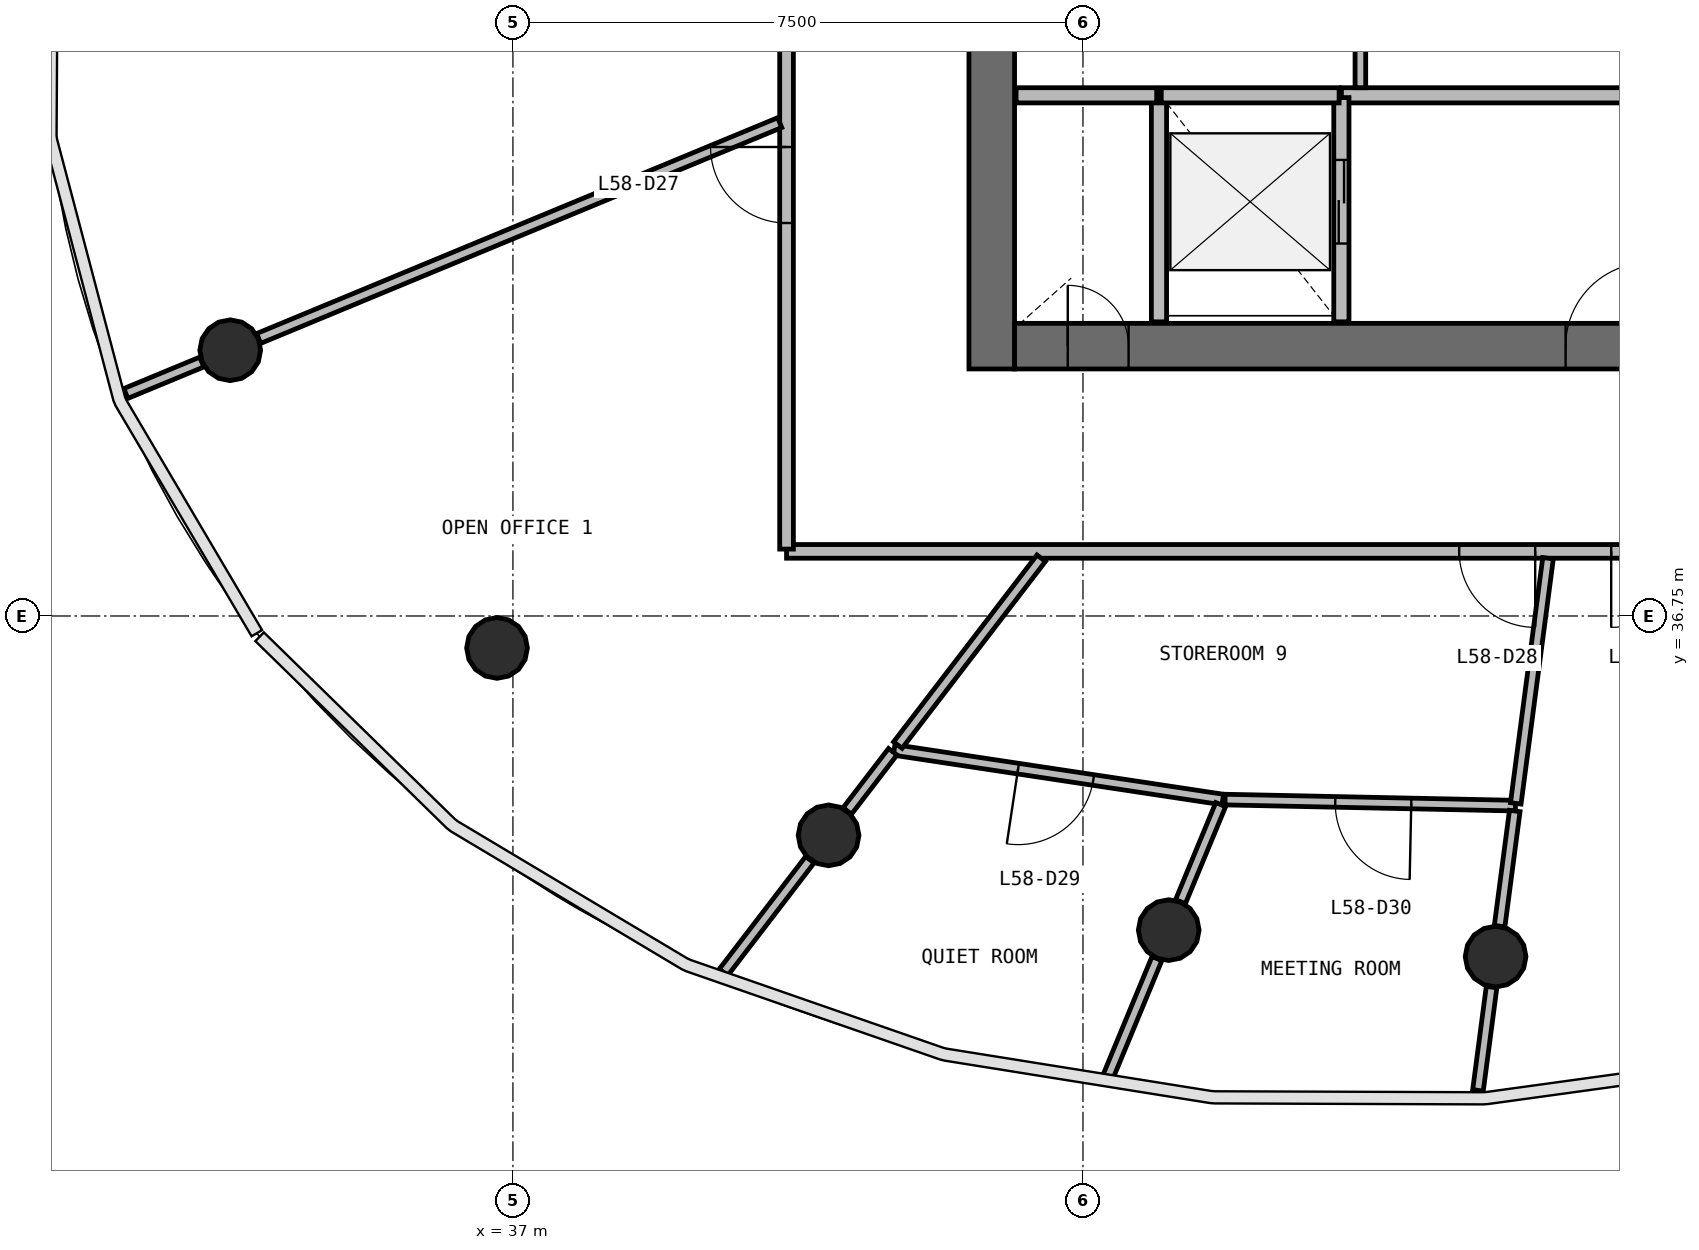
"""IFC4 building model, lengths in metres.
Left out: names, types, materials, properties, quantities, classifications, styles, units other than length and angle.
Written with IfcOpenShell. Run it as: python <this file> out.ifc"""

import sys

from ifc_helpers import new_model, si_unit, direction, frame, frame_2d, origin, origin_2d, place, context, subcontext, project, spatial, rectangle, circle, extrude, source, transform, mapped, element, fill, save


model = new_model("IFC4")
c1 = context("Model", 3, precision=1e-05, world=origin(), true_north=direction((0.0, 1.0)))
c2 = subcontext(c1, "Body", "Model", "MODEL_VIEW")
j1 = project(units=[si_unit("LENGTHUNIT", "METRE"), si_unit("PLANEANGLEUNIT", "RADIAN")], contexts=[c1])
p1 = place(None, origin())
s1 = spatial("IfcSite", under=j1, at=p1, CompositionType="ELEMENT")
p2 = place(p1, origin())
s2 = spatial("IfcBuilding", under=s1, at=p2, CompositionType="ELEMENT")
p3 = place(p2, frame((0.0, 0.0, 238.4)))
s3 = spatial("IfcBuildingStorey", under=s2, at=p3, CompositionType="ELEMENT", Elevation=238.4)
p4 = place(p3, frame((43.3, 56.0, 0.0), z_axis=(0.0, 0.0, 1.0), x_axis=(0.0, -1.0, 0.0)))
e1 = element("IfcWall", 1, at=p4, inside=s3, PredefinedType="SHEAR", context=c2, shape_type="SweptSolid", body=[
    extrude(rectangle(XDim=16.0, YDim=0.6, at=frame_2d((8.0, 0.0))), origin(), (0.0, 0.0, 1.0), 3.9),
])
p5 = place(p4, frame((7.1, 0.0, 0.0)))
e2 = element("IfcOpeningElement", 2, at=p5, cuts=e1, PredefinedType="OPENING", context=c2, shape_type="SweptSolid", body=[
    extrude(rectangle(XDim=1.8, YDim=2.1, at=frame_2d((0.9, 1.05))), frame((0.0, 0.31, 0.0), z_axis=(0.0, -1.0, 0.0), x_axis=(1.0, 0.0, 0.0)), (0.0, 0.0, 1.0), 0.62),
])
p6 = place(p3, frame((43.6, 40.3, 0.0), z_axis=(0.0, 0.0, 1.0), x_axis=(1.0, 0.0, 0.0)))
e3 = element("IfcWall", 3, at=p6, inside=s3, PredefinedType="SHEAR", context=c2, shape_type="SweptSolid", body=[
    extrude(rectangle(XDim=16.8, YDim=0.6, at=frame_2d((8.4, 0.0))), origin(), (0.0, 0.0, 1.0), 3.9),
])
p7 = place(p6, frame((10.3, 0.0, 0.0)))
e4 = element("IfcOpeningElement", 4, at=p7, cuts=e3, PredefinedType="OPENING", context=c2, shape_type="SweptSolid", body=[
    extrude(rectangle(XDim=1.2, YDim=2.1, at=frame_2d((0.6, 1.05))), frame((0.0, 0.31, 0.0), z_axis=(0.0, -1.0, 0.0), x_axis=(1.0, 0.0, 0.0)), (0.0, 0.0, 1.0), 0.62),
])
p8 = place(p6, frame((7.25, 0.0, 0.0)))
e5 = element("IfcOpeningElement", 5, at=p8, cuts=e3, PredefinedType="OPENING", context=c2, shape_type="SweptSolid", body=[
    extrude(rectangle(XDim=1.1, YDim=2.1, at=frame_2d((0.55, 1.05))), frame((0.0, 0.31, 0.0), z_axis=(0.0, -1.0, 0.0), x_axis=(1.0, 0.0, 0.0)), (0.0, 0.0, 1.0), 0.62),
])
p9 = place(p6, frame((0.7, 0.0, 0.0)))
e6 = element("IfcOpeningElement", 6, at=p9, cuts=e3, PredefinedType="OPENING", context=c2, shape_type="SweptSolid", body=[
    extrude(rectangle(XDim=0.8, YDim=2.1, at=frame_2d((0.4, 1.05))), frame((0.0, 0.31, 0.0), z_axis=(0.0, -1.0, 0.0), x_axis=(1.0, 0.0, 0.0)), (0.0, 0.0, 1.0), 0.62),
])
m1 = source(origin(), c2, "Body", "SweptSolid", [
    extrude(circle(Radius=0.4, at=origin_2d()), origin(), (0.0, 0.0, 1.0), 3.9),
])
for number, where, z_axis, x_axis in (
    (7, (33.281, 40.246, 0.0), (0.0, 0.0, 1.0), (1.0, 0.0, 0.0)),
    (8, (36.791, 36.329, 0.0), (0.0, 0.0, 1.0), (1.0, 0.0, 0.0)),
    (9, (41.153, 33.864, 0.0), (0.0, 0.0, 1.0), (1.0, 0.0, 0.0)),
    (10, (45.628, 32.617, 0.0), (0.0, 0.0, 1.0), (1.0, 0.0, 0.0)),
    (11, (49.929, 32.269, 0.0), (0.0, 0.0, 1.0), (1.0, 0.0, 0.0)),
):
    element("IfcColumn", number, at=place(p3, frame(where, z_axis=z_axis, x_axis=x_axis)), inside=s3, PredefinedType="COLUMN", context=c2, shape_type="MappedRepresentation", body=[
        mapped(m1, transform((0.0, 0.0, 0.0), scale=1.0)),
    ])
p10 = place(p3, frame((52.7, 43.6, 0.0), z_axis=(0.0, 0.0, 1.0), x_axis=(-1.0, 0.0, 0.0)))
e12 = element("IfcWall", 12, at=p10, inside=s3, PredefinedType="SOLIDWALL", context=c2, shape_type="SweptSolid", body=[
    extrude(rectangle(XDim=4.8, YDim=0.2, at=frame_2d((2.4, 0.0))), origin(), (0.0, 0.0, 1.0), 3.58),
])
p11 = place(p3, frame((45.5, 43.6, 0.0), z_axis=(0.0, 0.0, 1.0), x_axis=(0.0, -1.0, 0.0)))
e13 = element("IfcWall", 13, at=p11, inside=s3, PredefinedType="SOLIDWALL", context=c2, shape_type="SweptSolid", body=[
    extrude(rectangle(XDim=2.98, YDim=0.2, at=frame_2d((1.49, 0.0))), origin(), (0.0, 0.0, 1.0), 3.58),
])
p12 = place(p3, frame((47.9, 40.62, 0.0), z_axis=(0.0, 0.0, 1.0), x_axis=(0.0, 1.0, 0.0)))
e14 = element("IfcWall", 14, at=p12, inside=s3, PredefinedType="SOLIDWALL", context=c2, shape_type="SweptSolid", body=[
    extrude(rectangle(XDim=2.95, YDim=0.2, at=frame_2d((1.475, 0.0))), origin(), (0.0, 0.0, 1.0), 3.58),
])
p13 = place(p12, frame((1.03, 0.0, 0.0)))
e15 = element("IfcOpeningElement", 15, at=p13, cuts=e14, PredefinedType="OPENING", context=c2, shape_type="SweptSolid", body=[
    extrude(rectangle(XDim=1.1, YDim=2.1, at=frame_2d((0.55, 1.05))), frame((0.0, 0.11, 0.0), z_axis=(0.0, -1.0, 0.0), x_axis=(1.0, 0.0, 0.0)), (0.0, 0.0, 1.0), 0.22),
])
p14 = place(p3, frame((47.87, 43.6, 0.0), z_axis=(0.0, 0.0, 1.0), x_axis=(-1.0, 0.0, 0.0)))
e16 = element("IfcWall", 16, at=p14, inside=s3, PredefinedType="SOLIDWALL", context=c2, shape_type="SweptSolid", body=[
    extrude(rectangle(XDim=2.34, YDim=0.2, at=frame_2d((1.17, 0.0))), origin(), (0.0, 0.0, 1.0), 3.58),
])
p15 = place(p3, frame((45.47, 43.6, 0.0), z_axis=(0.0, 0.0, 1.0), x_axis=(-1.0, 0.0, 0.0)))
e17 = element("IfcWall", 17, at=p15, inside=s3, PredefinedType="SOLIDWALL", context=c2, shape_type="SweptSolid", body=[
    extrude(rectangle(XDim=1.85, YDim=0.2, at=frame_2d((0.925, 0.0))), origin(), (0.0, 0.0, 1.0), 3.58),
])
p16 = place(p3, frame((63.4, 37.6, 0.0), z_axis=(0.0, 0.0, 1.0), x_axis=(-1.0, 0.0, 0.0)))
e18 = element("IfcWall", 18, at=p16, inside=s3, PredefinedType="PARTITIONING", context=c2, shape_type="SweptSolid", body=[
    extrude(rectangle(XDim=22.8, YDim=0.18, at=frame_2d((11.4, 0.0))), origin(), (0.0, 0.0, 1.0), 2.88),
])
p17 = place(p16, frame((12.95, 0.0, 0.0)))
e19 = element("IfcOpeningElement", 19, at=p17, cuts=e18, PredefinedType="OPENING", context=c2, shape_type="SweptSolid", body=[
    extrude(rectangle(XDim=1.0, YDim=2.1, at=frame_2d((0.5, 1.05))), frame((0.0, 0.1, 0.0), z_axis=(0.0, -1.0, 0.0), x_axis=(1.0, 0.0, 0.0)), (0.0, 0.0, 1.0), 0.2),
])
p18 = place(p16, frame((10.95, 0.0, 0.0)))
e20 = element("IfcOpeningElement", 20, at=p18, cuts=e18, PredefinedType="OPENING", context=c2, shape_type="SweptSolid", body=[
    extrude(rectangle(XDim=1.0, YDim=2.1, at=frame_2d((0.5, 1.05))), frame((0.0, 0.1, 0.0), z_axis=(0.0, -1.0, 0.0), x_axis=(1.0, 0.0, 0.0)), (0.0, 0.0, 1.0), 0.2),
])
p19 = place(p16, frame((5.75, 0.0, 0.0)))
e21 = element("IfcOpeningElement", 21, at=p19, cuts=e18, PredefinedType="OPENING", context=c2, shape_type="SweptSolid", body=[
    extrude(rectangle(XDim=1.0, YDim=2.1, at=frame_2d((0.5, 1.05))), frame((0.0, 0.1, 0.0), z_axis=(0.0, -1.0, 0.0), x_axis=(1.0, 0.0, 0.0)), (0.0, 0.0, 1.0), 0.2),
])
p20 = place(p3, frame((40.6, 37.63, 0.0), z_axis=(0.0, 0.0, 1.0), x_axis=(0.0, 1.0, 0.0)))
e22 = element("IfcWall", 22, at=p20, inside=s3, PredefinedType="PARTITIONING", context=c2, shape_type="SweptSolid", body=[
    extrude(rectangle(XDim=20.74, YDim=0.18, at=frame_2d((10.37, 0.0))), origin(), (0.0, 0.0, 1.0), 2.88),
])
p21 = place(p20, frame((9.89, 0.0, 0.0)))
e23 = element("IfcOpeningElement", 23, at=p21, cuts=e22, PredefinedType="OPENING", context=c2, shape_type="SweptSolid", body=[
    extrude(rectangle(XDim=1.0, YDim=2.1, at=frame_2d((0.5, 1.05))), frame((0.0, 0.1, 0.0), z_axis=(0.0, -1.0, 0.0), x_axis=(1.0, 0.0, 0.0)), (0.0, 0.0, 1.0), 0.2),
])
p22 = place(p20, frame((4.29, 0.0, 0.0)))
e24 = element("IfcOpeningElement", 24, at=p22, cuts=e22, PredefinedType="OPENING", context=c2, shape_type="SweptSolid", body=[
    extrude(rectangle(XDim=1.0, YDim=2.1, at=frame_2d((0.5, 1.05))), frame((0.0, 0.1, 0.0), z_axis=(0.0, -1.0, 0.0), x_axis=(1.0, 0.0, 0.0)), (0.0, 0.0, 1.0), 0.2),
])
p23 = place(p3, frame((40.51, 43.241, 0.0), z_axis=(0.0, 0.0, 1.0), x_axis=(-0.92388089155, -0.38268015134, 0.0)))
e25 = element("IfcWall", 25, at=p23, inside=s3, PredefinedType="PARTITIONING", context=c2, shape_type="SweptSolid", body=[
    extrude(rectangle(XDim=7.42, YDim=0.14, at=frame_2d((3.71, 0.0))), origin(), (0.0, 0.0, 1.0), 2.88),
])
p24 = place(p3, frame((46.34, 34.335, 0.0), z_axis=(0.0, 0.0, 1.0), x_axis=(-0.988786802826, 0.149334050224, 0.0)))
e26 = element("IfcWall", 26, at=p24, inside=s3, PredefinedType="PARTITIONING", context=c2, shape_type="SweptSolid", body=[
    extrude(rectangle(XDim=4.373, YDim=0.14, at=frame_2d((2.187, 0.0))), origin(), (0.0, 0.0, 1.0), 2.88),
])
p25 = place(p24, frame((1.723, 0.0, 0.0)))
e27 = element("IfcOpeningElement", 27, at=p25, cuts=e26, PredefinedType="OPENING", context=c2, shape_type="SweptSolid", body=[
    extrude(rectangle(XDim=1.0, YDim=2.1, at=frame_2d((0.5, 1.05))), frame((0.0, 0.08, 0.0), z_axis=(0.0, -1.0, 0.0), x_axis=(1.0, 0.0, 0.0)), (0.0, 0.0, 1.0), 0.16),
])
p26 = place(p3, frame((50.19, 34.255, 0.0), z_axis=(0.0, 0.0, 1.0), x_axis=(-0.999781752069, 0.020891343404, 0.0)))
e28 = element("IfcWall", 28, at=p26, inside=s3, PredefinedType="PARTITIONING", context=c2, shape_type="SweptSolid", body=[
    extrude(rectangle(XDim=3.821, YDim=0.14, at=frame_2d((1.911, 0.0))), origin(), (0.0, 0.0, 1.0), 2.88),
])
p27 = place(p26, frame((1.371, 0.0, 0.0)))
e29 = element("IfcOpeningElement", 29, at=p27, cuts=e28, PredefinedType="OPENING", context=c2, shape_type="SweptSolid", body=[
    extrude(rectangle(XDim=1.0, YDim=2.1, at=frame_2d((0.5, 1.05))), frame((0.0, 0.08, 0.0), z_axis=(0.0, -1.0, 0.0), x_axis=(1.0, 0.0, 0.0)), (0.0, 0.0, 1.0), 0.16),
])
p28 = place(p3, frame((50.619, 37.51, 0.0), z_axis=(0.0, 0.0, 1.0), x_axis=(-0.130506927867, -0.991447397384, 0.0)))
e30 = element("IfcWall", 30, at=p28, inside=s3, PredefinedType="PARTITIONING", context=c2, shape_type="SweptSolid", body=[
    extrude(rectangle(XDim=3.253, YDim=0.14, at=frame_2d((1.626, 0.0))), origin(), (0.0, 0.0, 1.0), 2.88),
])
p29 = place(p3, frame((43.951, 37.51, 0.0), z_axis=(0.0, 0.0, 1.0), x_axis=(-0.608762283449, -0.793352684655, 0.0)))
e31 = element("IfcWall", 31, at=p29, inside=s3, PredefinedType="PARTITIONING", context=c2, shape_type="SweptSolid", body=[
    extrude(rectangle(XDim=3.099, YDim=0.14, at=frame_2d((1.549, 0.0))), origin(), (0.0, 0.0, 1.0), 2.88),
])
p30 = place(p3, frame((48.15, 43.7, 0.0), z_axis=(0.0, 0.0, 1.0), x_axis=(0.0, 1.0, 0.0)))
e32 = element("IfcWall", 32, at=p30, inside=s3, PredefinedType="PARTITIONING", context=c2, shape_type="SweptSolid", body=[
    extrude(rectangle(XDim=2.29, YDim=0.14, at=frame_2d((1.145, 0.0))), origin(), (0.0, 0.0, 1.0), 2.88),
])
p31 = place(p3, frame((40.907, 33.543, 0.0), z_axis=(0.0, 0.0, 1.0), x_axis=(-0.608634864528, -0.793450440595, 0.0)))
e33 = element("IfcWall", 33, at=p31, inside=s3, PredefinedType="PARTITIONING", context=c2, shape_type="SweptSolid", body=[
    extrude(rectangle(XDim=1.865, YDim=0.14, at=frame_2d((0.933, 0.0))), origin(), (0.0, 0.0, 1.0), 2.88),
])
p32 = place(p3, frame((45.473, 32.243, 0.0), z_axis=(0.0, 0.0, 1.0), x_axis=(-0.382750878351, -0.923851592585, 0.0)))
e34 = element("IfcWall", 34, at=p32, inside=s3, PredefinedType="PARTITIONING", context=c2, shape_type="SweptSolid", body=[
    extrude(rectangle(XDim=1.693, YDim=0.14, at=frame_2d((0.846, 0.0))), origin(), (0.0, 0.0, 1.0), 2.88),
])
p33 = place(p3, frame((50.181, 34.185, 0.0), z_axis=(0.0, 0.0, 1.0), x_axis=(-0.130520633203, -0.991445593216, 0.0)))
e35 = element("IfcWall", 35, at=p33, inside=s3, PredefinedType="PARTITIONING", context=c2, shape_type="SweptSolid", body=[
    extrude(rectangle(XDim=1.528, YDim=0.14, at=frame_2d((0.764, 0.0))), origin(), (0.0, 0.0, 1.0), 2.88),
])
p34 = place(p3, frame((46.312, 34.269, 0.0), z_axis=(0.0, 0.0, 1.0), x_axis=(-0.382783403295, -0.923838116859, 0.0)))
e36 = element("IfcWall", 36, at=p34, inside=s3, PredefinedType="PARTITIONING", context=c2, shape_type="SweptSolid", body=[
    extrude(rectangle(XDim=1.382, YDim=0.14, at=frame_2d((0.691, 0.0))), origin(), (0.0, 0.0, 1.0), 2.88),
])
p35 = place(p3, frame((49.876, 31.868, 0.0), z_axis=(0.0, 0.0, 1.0), x_axis=(-0.130565096745, -0.991439738719, 0.0)))
e37 = element("IfcWall", 37, at=p35, inside=s3, PredefinedType="PARTITIONING", context=c2, shape_type="SweptSolid", body=[
    extrude(rectangle(XDim=1.371, YDim=0.14, at=frame_2d((0.685, 0.0))), origin(), (0.0, 0.0, 1.0), 2.88),
])
p36 = place(p3, frame((32.906, 40.091, 0.0), z_axis=(0.0, 0.0, 1.0), x_axis=(-0.923862802911, -0.382723818695, 0.0)))
e38 = element("IfcWall", 38, at=p36, inside=s3, PredefinedType="PARTITIONING", context=c2, shape_type="SweptSolid", body=[
    extrude(rectangle(XDim=1.082, YDim=0.14, at=frame_2d((0.541, 0.0))), origin(), (0.0, 0.0, 1.0), 2.88),
])
p37 = place(p3, frame((41.997, 34.964, 0.0), z_axis=(0.0, 0.0, 1.0), x_axis=(-0.608713283109, -0.793390281619, 0.0)))
e39 = element("IfcWall", 39, at=p37, inside=s3, PredefinedType="PARTITIONING", context=c2, shape_type="SweptSolid", body=[
    extrude(rectangle(XDim=0.982, YDim=0.14, at=frame_2d((0.491, 0.0))), origin(), (0.0, 0.0, 1.0), 2.88),
])
m2 = source(origin(), c2, "Body", "SweptSolid", [
    extrude(rectangle(XDim=1.1, YDim=2.1, at=frame_2d((0.55, 1.05))), frame((0.0, 0.025, 0.0), z_axis=(0.0, -1.0, 0.0), x_axis=(1.0, 0.0, 0.0)), (0.0, 0.0, 1.0), 0.05),
])
p38 = place(p13, origin())
e40 = element("IfcDoor", 40, at=p38, inside=s3, OperationType="DOUBLE_DOOR_SLIDING", PredefinedType="USERDEFINED", context=c2, shape_type="MappedRepresentation", body=[
    mapped(m2, transform((0.0, 0.0, 0.0), scale=1.0)),
])
fill(e15, e40)
m3 = source(origin(), c2, "Body", "SweptSolid", [
    extrude(rectangle(XDim=1.1, YDim=2.1, at=frame_2d((0.55, 1.05))), frame((0.0, 0.025, 0.0), z_axis=(0.0, -1.0, 0.0), x_axis=(1.0, 0.0, 0.0)), (0.0, 0.0, 1.0), 0.05),
])
p39 = place(p8, origin())
e41 = element("IfcDoor", 41, at=p39, inside=s3, OperationType="SINGLE_SWING_RIGHT", PredefinedType="DOOR", context=c2, shape_type="MappedRepresentation", body=[
    mapped(m3, transform((0.0, 0.0, 0.0), scale=1.0)),
])
fill(e5, e41)
m4 = source(origin(), c2, "Body", "SweptSolid", [
    extrude(rectangle(XDim=0.8, YDim=2.1, at=frame_2d((0.4, 1.05))), frame((0.0, 0.025, 0.0), z_axis=(0.0, -1.0, 0.0), x_axis=(1.0, 0.0, 0.0)), (0.0, 0.0, 1.0), 0.05),
])
p40 = place(p9, origin())
e42 = element("IfcDoor", 42, at=p40, inside=s3, OperationType="SINGLE_SWING_LEFT", PredefinedType="DOOR", context=c2, shape_type="MappedRepresentation", body=[
    mapped(m4, transform((0.0, 0.0, 0.0), scale=1.0)),
])
fill(e6, e42)
m5 = source(origin(), c2, "Body", "SweptSolid", [
    extrude(rectangle(XDim=1.0, YDim=2.1, at=frame_2d((0.5, 1.05))), frame((0.0, 0.025, 0.0), z_axis=(0.0, -1.0, 0.0), x_axis=(1.0, 0.0, 0.0)), (0.0, 0.0, 1.0), 0.05),
])
p41 = place(p22, origin())
e43 = element("IfcDoor", 43, at=p41, inside=s3, OperationType="SINGLE_SWING_RIGHT", PredefinedType="DOOR", context=c2, shape_type="MappedRepresentation", body=[
    mapped(m5, transform((0.0, 0.0, 0.0), scale=1.0)),
])
fill(e24, e43)
p42 = place(p17, origin())
e44 = element("IfcDoor", 44, at=p42, inside=s3, OperationType="SINGLE_SWING_LEFT", PredefinedType="DOOR", context=c2, shape_type="MappedRepresentation", body=[
    mapped(m5, transform((0.0, 0.0, 0.0), scale=1.0)),
])
fill(e19, e44)
p43 = place(p25, origin())
e45 = element("IfcDoor", 45, at=p43, inside=s3, OperationType="SINGLE_SWING_RIGHT", PredefinedType="DOOR", context=c2, shape_type="MappedRepresentation", body=[
    mapped(m5, transform((0.0, 0.0, 0.0), scale=1.0)),
])
fill(e27, e45)
p44 = place(p27, origin())
e46 = element("IfcDoor", 46, at=p44, inside=s3, OperationType="SINGLE_SWING_LEFT", PredefinedType="DOOR", context=c2, shape_type="MappedRepresentation", body=[
    mapped(m5, transform((0.0, 0.0, 0.0), scale=1.0)),
])
fill(e29, e46)
p45 = place(p18, origin())
e47 = element("IfcDoor", 47, at=p45, inside=s3, OperationType="SINGLE_SWING_RIGHT", PredefinedType="DOOR", context=c2, shape_type="MappedRepresentation", body=[
    mapped(m5, transform((0.0, 0.0, 0.0), scale=1.0)),
])
fill(e20, e47)
save(model, sys.argv[1])
